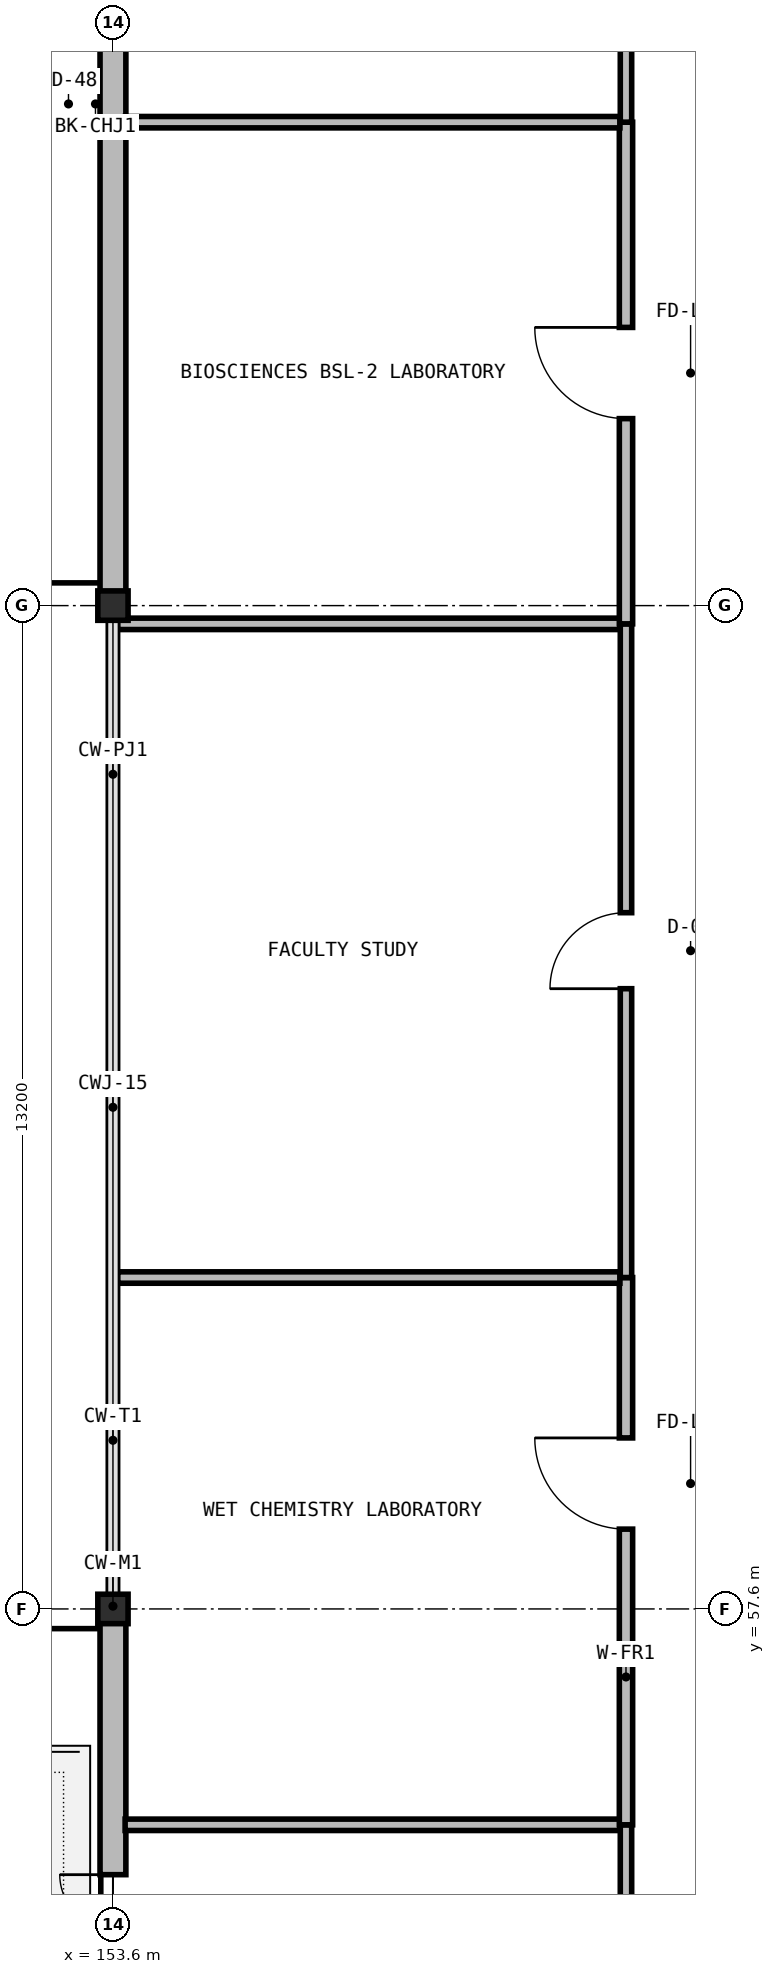
"""IFC4 building model, lengths in metres.
Left out: names, types, materials, properties, quantities, classifications, styles, units other than length and angle.
Written with IfcOpenShell. Run it as: python <this file> out.ifc"""

import sys

from ifc_helpers import new_model, si_unit, direction, frame, frame_2d, origin, origin_2d, place, context, subcontext, project, spatial, rectangle, i_section, extrude, element, fill, save


model = new_model("IFC4")
c1 = context("Model", 3, precision=1e-05, world=origin(), true_north=direction((0.0, 1.0)))
c2 = subcontext(c1, "Body", "Model", "MODEL_VIEW")
j1 = project(units=[si_unit("LENGTHUNIT", "METRE"), si_unit("PLANEANGLEUNIT", "RADIAN")], contexts=[c1])
p1 = place(None, origin())
s1 = spatial("IfcSite", under=j1, at=p1, CompositionType="ELEMENT")
p2 = place(p1, origin())
s2 = spatial("IfcBuilding", under=s1, at=p2, CompositionType="ELEMENT")
p3 = place(p2, frame((0.0, 0.0, 5.25)))
s3 = spatial("IfcBuildingStorey", under=s2, at=p3, CompositionType="ELEMENT", Elevation=5.25)
for number, where, z_axis, x_axis in (
    (1, (153.6, 57.6, 0.0), (0.0, 0.0, 1.0), (1.0, 0.0, 0.0)),
    (2, (153.6, 70.8, 0.0), (0.0, 0.0, 1.0), (1.0, 0.0, 0.0)),
):
    element("IfcColumn", number, at=place(p3, frame(where, z_axis=z_axis, x_axis=x_axis)), inside=s3, PredefinedType="COLUMN", context=c2, shape_type="SweptSolid", body=[
        extrude(i_section(OverallWidth=0.398, OverallDepth=0.387, WebThickness=0.024, FlangeThickness=0.039, at=origin_2d()), origin(), (0.0, 0.0, 1.0), 4.55),
    ])
p4 = place(p3, frame((153.6, 44.404, 0.0), z_axis=(0.0, 0.0, 1.0), x_axis=(0.0, 1.0, 0.0)))
e3 = element("IfcWall", 3, at=p4, inside=s3, PredefinedType="SOLIDWALL", context=c2, shape_type="SweptSolid", body=[
    extrude(rectangle(XDim=13.192, YDim=0.34, at=frame_2d((6.596, 0.0))), origin(), (0.0, 0.0, 1.0), 3.72),
])
p5 = place(p4, frame((8.3, 0.0, 0.0)))
e4 = element("IfcOpeningElement", 4, at=p5, cuts=e3, PredefinedType="OPENING", context=c2, shape_type="SweptSolid", body=[
    extrude(rectangle(XDim=1.4, YDim=2.2, at=frame_2d((0.7, 1.1))), frame((0.0, 0.18, 0.0), z_axis=(0.0, -1.0, 0.0), x_axis=(1.0, 0.0, 0.0)), (0.0, 0.0, 1.0), 0.36),
])
p6 = place(p3, frame((153.6, 70.804, 0.0), z_axis=(0.0, 0.0, 1.0), x_axis=(0.0, 1.0, 0.0)))
e5 = element("IfcWall", 5, at=p6, inside=s3, PredefinedType="SOLIDWALL", context=c2, shape_type="SweptSolid", body=[
    extrude(rectangle(XDim=13.192, YDim=0.34, at=frame_2d((6.596, 0.0))), origin(), (0.0, 0.0, 1.0), 3.742),
])
p7 = place(p3, frame((160.35, 44.96, 0.0), z_axis=(0.0, 0.0, 1.0), x_axis=(0.0, 1.0, 0.0)))
e6 = element("IfcWall", 6, at=p7, inside=s3, PredefinedType="PARTITIONING", context=c2, shape_type="SweptSolid", body=[
    extrude(rectangle(XDim=9.8, YDim=0.15, at=frame_2d((4.9, 0.0))), origin(), (0.0, 0.0, 1.0), 4.23),
])
p8 = place(p7, frame((4.4, 0.0, 0.0)))
e7 = element("IfcOpeningElement", 7, at=p8, cuts=e6, PredefinedType="OPENING", context=c2, shape_type="SweptSolid", body=[
    extrude(rectangle(XDim=1.0, YDim=2.2, at=frame_2d((0.5, 1.1))), frame((0.0, 0.085, 0.0), z_axis=(0.0, -1.0, 0.0), x_axis=(1.0, 0.0, 0.0)), (0.0, 0.0, 1.0), 0.17),
])
p9 = place(p3, frame((153.76, 54.76, 0.0), z_axis=(0.0, 0.0, 1.0), x_axis=(1.0, 0.0, 0.0)))
e8 = element("IfcWall", 8, at=p9, inside=s3, PredefinedType="PARTITIONING", context=c2, shape_type="SweptSolid", body=[
    extrude(rectangle(XDim=6.51, YDim=0.15, at=frame_2d((3.255, 0.0))), origin(), (0.0, 0.0, 1.0), 4.23),
])
p10 = place(p3, frame((160.35, 54.76, 0.0), z_axis=(0.0, 0.0, 1.0), x_axis=(0.0, 1.0, 0.0)))
e9 = element("IfcWall", 9, at=p10, inside=s3, PredefinedType="PARTITIONING", context=c2, shape_type="SweptSolid", body=[
    extrude(rectangle(XDim=7.2, YDim=0.175, at=frame_2d((3.6, 0.0))), origin(), (0.0, 0.0, 1.0), 4.23),
])
p11 = place(p10, frame((3.89, 0.0, 0.0)))
e10 = element("IfcOpeningElement", 10, at=p11, cuts=e9, PredefinedType="OPENING", context=c2, shape_type="SweptSolid", body=[
    extrude(rectangle(XDim=1.2, YDim=2.2, at=frame_2d((0.6, 1.1))), frame((0.0, 0.097, 0.0), z_axis=(0.0, -1.0, 0.0), x_axis=(1.0, 0.0, 0.0)), (0.0, 0.0, 1.0), 0.195),
])
p12 = place(p3, frame((153.66, 61.96, 0.0), z_axis=(0.0, 0.0, 1.0), x_axis=(1.0, 0.0, 0.0)))
e11 = element("IfcWall", 11, at=p12, inside=s3, PredefinedType="PARTITIONING", context=c2, shape_type="SweptSolid", body=[
    extrude(rectangle(XDim=6.61, YDim=0.15, at=frame_2d((3.305, 0.0))), origin(), (0.0, 0.0, 1.0), 4.23),
])
p13 = place(p3, frame((160.35, 61.96, 0.0), z_axis=(0.0, 0.0, 1.0), x_axis=(0.0, 1.0, 0.0)))
e12 = element("IfcWall", 12, at=p13, inside=s3, PredefinedType="PARTITIONING", context=c2, shape_type="SweptSolid", body=[
    extrude(rectangle(XDim=8.6, YDim=0.15, at=frame_2d((4.3, 0.0))), origin(), (0.0, 0.0, 1.0), 4.23),
])
p14 = place(p13, frame((3.8, 0.0, 0.0)))
e13 = element("IfcOpeningElement", 13, at=p14, cuts=e12, PredefinedType="OPENING", context=c2, shape_type="SweptSolid", body=[
    extrude(rectangle(XDim=1.0, YDim=2.2, at=frame_2d((0.5, 1.1))), frame((0.0, 0.085, 0.0), z_axis=(0.0, -1.0, 0.0), x_axis=(1.0, 0.0, 0.0)), (0.0, 0.0, 1.0), 0.17),
])
p15 = place(p3, frame((153.66, 70.56, 0.0), z_axis=(0.0, 0.0, 1.0), x_axis=(1.0, 0.0, 0.0)))
e14 = element("IfcWall", 14, at=p15, inside=s3, PredefinedType="PARTITIONING", context=c2, shape_type="SweptSolid", body=[
    extrude(rectangle(XDim=6.61, YDim=0.15, at=frame_2d((3.305, 0.0))), origin(), (0.0, 0.0, 1.0), 4.23),
])
p16 = place(p3, frame((160.35, 70.56, 0.0), z_axis=(0.0, 0.0, 1.0), x_axis=(0.0, 1.0, 0.0)))
e15 = element("IfcWall", 15, at=p16, inside=s3, PredefinedType="PARTITIONING", context=c2, shape_type="SweptSolid", body=[
    extrude(rectangle(XDim=6.6, YDim=0.175, at=frame_2d((3.3, 0.0))), origin(), (0.0, 0.0, 1.0), 4.23),
])
p17 = place(p16, frame((2.7, 0.0, 0.0)))
e16 = element("IfcOpeningElement", 16, at=p17, cuts=e15, PredefinedType="OPENING", context=c2, shape_type="SweptSolid", body=[
    extrude(rectangle(XDim=1.2, YDim=2.2, at=frame_2d((0.6, 1.1))), frame((0.0, 0.097, 0.0), z_axis=(0.0, -1.0, 0.0), x_axis=(1.0, 0.0, 0.0)), (0.0, 0.0, 1.0), 0.195),
])
p18 = place(p3, frame((153.76, 77.16, 0.0), z_axis=(0.0, 0.0, 1.0), x_axis=(1.0, 0.0, 0.0)))
e17 = element("IfcWall", 17, at=p18, inside=s3, PredefinedType="PARTITIONING", context=c2, shape_type="SweptSolid", body=[
    extrude(rectangle(XDim=6.51, YDim=0.15, at=frame_2d((3.255, 0.0))), origin(), (0.0, 0.0, 1.0), 4.23),
])
p19 = place(p3, frame((160.35, 77.16, 0.0), z_axis=(0.0, 0.0, 1.0), x_axis=(0.0, 1.0, 0.0)))
e18 = element("IfcWall", 18, at=p19, inside=s3, PredefinedType="PARTITIONING", context=c2, shape_type="SweptSolid", body=[
    extrude(rectangle(XDim=9.8, YDim=0.15, at=frame_2d((4.9, 0.0))), origin(), (0.0, 0.0, 1.0), 4.23),
])
p20 = place(p19, frame((4.4, 0.0, 0.0)))
e19 = element("IfcOpeningElement", 19, at=p20, cuts=e18, PredefinedType="OPENING", context=c2, shape_type="SweptSolid", body=[
    extrude(rectangle(XDim=1.0, YDim=2.2, at=frame_2d((0.5, 1.1))), frame((0.0, 0.085, 0.0), z_axis=(0.0, -1.0, 0.0), x_axis=(1.0, 0.0, 0.0)), (0.0, 0.0, 1.0), 0.17),
])
p21 = place(p5, origin())
e20 = element("IfcDoor", 20, at=p21, inside=s3, OperationType="DOUBLE_DOOR_SINGLE_SWING", PredefinedType="DOOR", context=c2, shape_type="SweptSolid", body=[
    extrude(rectangle(XDim=1.4, YDim=2.2, at=frame_2d((0.7, 1.1))), frame((0.0, 0.025, 0.0), z_axis=(0.0, -1.0, 0.0), x_axis=(1.0, 0.0, 0.0)), (0.0, 0.0, 1.0), 0.05),
])
fill(e4, e20)
p22 = place(p11, origin())
e21 = element("IfcDoor", 21, at=p22, inside=s3, OperationType="SINGLE_SWING_RIGHT", PredefinedType="DOOR", context=c2, shape_type="SweptSolid", body=[
    extrude(rectangle(XDim=1.2, YDim=2.2, at=frame_2d((0.6, 1.1))), frame((0.0, 0.025, 0.0), z_axis=(0.0, -1.0, 0.0), x_axis=(1.0, 0.0, 0.0)), (0.0, 0.0, 1.0), 0.05),
])
fill(e10, e21)
p23 = place(p14, origin())
e22 = element("IfcDoor", 22, at=p23, inside=s3, OperationType="SINGLE_SWING_LEFT", PredefinedType="DOOR", context=c2, shape_type="SweptSolid", body=[
    extrude(rectangle(XDim=1.0, YDim=2.2, at=frame_2d((0.5, 1.1))), frame((0.0, 0.025, 0.0), z_axis=(0.0, -1.0, 0.0), x_axis=(1.0, 0.0, 0.0)), (0.0, 0.0, 1.0), 0.05),
])
fill(e13, e22)
p24 = place(p17, origin())
e23 = element("IfcDoor", 23, at=p24, inside=s3, OperationType="SINGLE_SWING_RIGHT", PredefinedType="DOOR", context=c2, shape_type="SweptSolid", body=[
    extrude(rectangle(XDim=1.2, YDim=2.2, at=frame_2d((0.6, 1.1))), frame((0.0, 0.025, 0.0), z_axis=(0.0, -1.0, 0.0), x_axis=(1.0, 0.0, 0.0)), (0.0, 0.0, 1.0), 0.05),
])
fill(e16, e23)
save(model, sys.argv[1])
